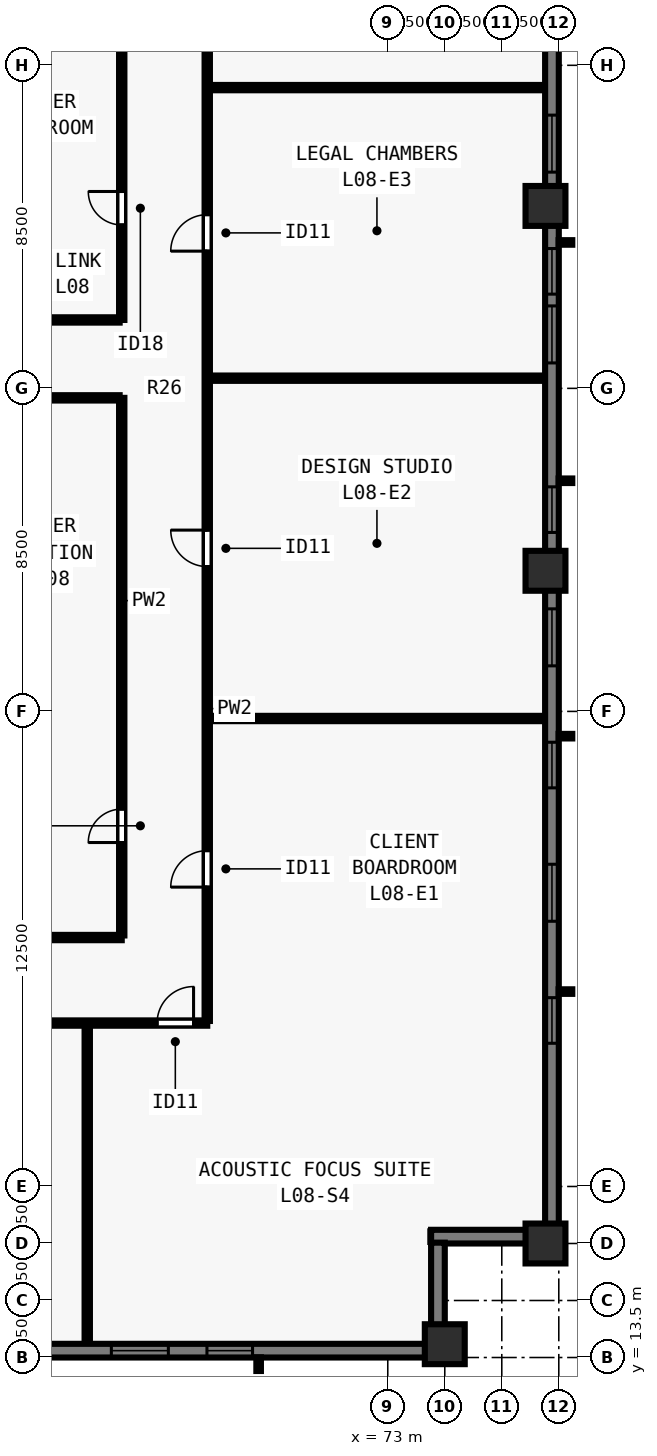
"""IFC4 building model, lengths in metres.
Left out: names, types, materials, properties, quantities, classifications, styles, units other than length and angle.
Written with IfcOpenShell. Run it as: python <this file> out.ifc"""

import sys

from ifc_helpers import new_model, si_unit, direction, frame, frame_2d, origin, origin_2d, place, context, subcontext, project, spatial, rectangle, extrude, element, fill, save


model = new_model("IFC4")
c1 = context("Model", 3, precision=1e-05, world=origin(), true_north=direction((0.0, 1.0)))
c2 = subcontext(c1, "Body", "Model", "MODEL_VIEW")
j1 = project(units=[si_unit("LENGTHUNIT", "METRE"), si_unit("PLANEANGLEUNIT", "RADIAN")], contexts=[c1])
p1 = place(None, origin())
s1 = spatial("IfcSite", under=j1, at=p1, CompositionType="ELEMENT")
p2 = place(p1, origin())
s2 = spatial("IfcBuilding", under=s1, at=p2, CompositionType="ELEMENT")
p3 = place(p2, frame((0.0, 0.0, 34.0)))
s3 = spatial("IfcBuildingStorey", under=s2, at=p3, CompositionType="ELEMENT", Elevation=34.0)
for number, where, z_axis, x_axis in (
    (1, (74.5, 13.85, 0.0), (0.0, 0.0, 1.0), (1.0, 0.0, 0.0)),
    (2, (77.15, 16.5, 0.0), (0.0, 0.0, 1.0), (0.0, 1.0, 0.0)),
    (3, (77.15, 34.2, 0.0), (0.0, 0.0, 1.0), (0.0, 1.0, 0.0)),
    (4, (77.15, 43.8, 0.0), (0.0, 0.0, 1.0), (0.0, 1.0, 0.0)),
):
    element("IfcColumn", number, at=place(p3, frame(where, z_axis=z_axis, x_axis=x_axis)), inside=s3, PredefinedType="COLUMN", context=c2, shape_type="SweptSolid", body=[
        extrude(rectangle(XDim=1.05, YDim=1.05, at=origin_2d()), origin(), (0.0, 0.0, 1.0), 3.5),
    ])
p4 = place(p3, frame((77.32, 61.5, 0.0), z_axis=(0.0, 0.0, 1.0), x_axis=(0.0, -1.0, 0.0)))
e5 = element("IfcWall", 5, at=p4, inside=s3, PredefinedType="SOLIDWALL", context=c2, shape_type="SweptSolid", body=[
    extrude(rectangle(XDim=44.662, YDim=0.36, at=frame_2d((22.331, 0.0))), origin(), (0.0, 0.0, 1.0), 3.28),
])
p5 = place(p4, frame((4.93, 0.0, 0.8)))
e6 = element("IfcOpeningElement", 6, at=p5, cuts=e5, PredefinedType="OPENING", context=c2, shape_type="SweptSolid", body=[
    extrude(rectangle(XDim=1.2, YDim=1.544, at=frame_2d((0.6, 0.772))), frame((0.0, 0.19, 0.0), z_axis=(0.0, -1.0, 0.0), x_axis=(1.0, 0.0, 0.0)), (0.0, 0.0, 1.0), 0.38),
])
p6 = place(p4, frame((8.14, 0.0, 0.8)))
e7 = element("IfcOpeningElement", 7, at=p6, cuts=e5, PredefinedType="OPENING", context=c2, shape_type="SweptSolid", body=[
    extrude(rectangle(XDim=1.5, YDim=1.544, at=frame_2d((0.75, 0.772))), frame((0.0, 0.19, 0.0), z_axis=(0.0, -1.0, 0.0), x_axis=(1.0, 0.0, 0.0)), (0.0, 0.0, 1.0), 0.38),
])
p7 = place(p4, frame((11.65, 0.0, 0.8)))
e8 = element("IfcOpeningElement", 8, at=p7, cuts=e5, PredefinedType="OPENING", context=c2, shape_type="SweptSolid", body=[
    extrude(rectangle(XDim=1.2, YDim=1.544, at=frame_2d((0.6, 0.772))), frame((0.0, 0.19, 0.0), z_axis=(0.0, -1.0, 0.0), x_axis=(1.0, 0.0, 0.0)), (0.0, 0.0, 1.0), 0.38),
])
p8 = place(p4, frame((15.311, 0.0, 0.8)))
e9 = element("IfcOpeningElement", 9, at=p8, cuts=e5, PredefinedType="OPENING", context=c2, shape_type="SweptSolid", body=[
    extrude(rectangle(XDim=1.5, YDim=1.544, at=frame_2d((0.75, 0.772))), frame((0.0, 0.19, 0.0), z_axis=(0.0, -1.0, 0.0), x_axis=(1.0, 0.0, 0.0)), (0.0, 0.0, 1.0), 0.38),
])
p9 = place(p4, frame((18.821, 0.0, 0.8)))
e10 = element("IfcOpeningElement", 10, at=p9, cuts=e5, PredefinedType="OPENING", context=c2, shape_type="SweptSolid", body=[
    extrude(rectangle(XDim=1.2, YDim=1.544, at=frame_2d((0.6, 0.772))), frame((0.0, 0.19, 0.0), z_axis=(0.0, -1.0, 0.0), x_axis=(1.0, 0.0, 0.0)), (0.0, 0.0, 1.0), 0.38),
])
p10 = place(p4, frame((20.331, 0.0, 0.8)))
e11 = element("IfcOpeningElement", 11, at=p10, cuts=e5, PredefinedType="OPENING", context=c2, shape_type="SweptSolid", body=[
    extrude(rectangle(XDim=1.5, YDim=1.544, at=frame_2d((0.75, 0.772))), frame((0.0, 0.19, 0.0), z_axis=(0.0, -1.0, 0.0), x_axis=(1.0, 0.0, 0.0)), (0.0, 0.0, 1.0), 0.38),
])
p11 = place(p4, frame((25.091, 0.0, 0.8)))
e12 = element("IfcOpeningElement", 12, at=p11, cuts=e5, PredefinedType="OPENING", context=c2, shape_type="SweptSolid", body=[
    extrude(rectangle(XDim=1.2, YDim=1.544, at=frame_2d((0.6, 0.772))), frame((0.0, 0.19, 0.0), z_axis=(0.0, -1.0, 0.0), x_axis=(1.0, 0.0, 0.0)), (0.0, 0.0, 1.0), 0.38),
])
p12 = place(p4, frame((28.302, 0.0, 0.8)))
e13 = element("IfcOpeningElement", 13, at=p12, cuts=e5, PredefinedType="OPENING", context=c2, shape_type="SweptSolid", body=[
    extrude(rectangle(XDim=1.5, YDim=1.544, at=frame_2d((0.75, 0.772))), frame((0.0, 0.19, 0.0), z_axis=(0.0, -1.0, 0.0), x_axis=(1.0, 0.0, 0.0)), (0.0, 0.0, 1.0), 0.38),
])
p13 = place(p4, frame((31.812, 0.0, 0.8)))
e14 = element("IfcOpeningElement", 14, at=p13, cuts=e5, PredefinedType="OPENING", context=c2, shape_type="SweptSolid", body=[
    extrude(rectangle(XDim=1.2, YDim=1.544, at=frame_2d((0.6, 0.772))), frame((0.0, 0.19, 0.0), z_axis=(0.0, -1.0, 0.0), x_axis=(1.0, 0.0, 0.0)), (0.0, 0.0, 1.0), 0.38),
])
p14 = place(p4, frame((35.022, 0.0, 0.8)))
e15 = element("IfcOpeningElement", 15, at=p14, cuts=e5, PredefinedType="OPENING", context=c2, shape_type="SweptSolid", body=[
    extrude(rectangle(XDim=1.5, YDim=1.544, at=frame_2d((0.75, 0.772))), frame((0.0, 0.19, 0.0), z_axis=(0.0, -1.0, 0.0), x_axis=(1.0, 0.0, 0.0)), (0.0, 0.0, 1.0), 0.38),
])
p15 = place(p4, frame((38.532, 0.0, 0.8)))
e16 = element("IfcOpeningElement", 16, at=p15, cuts=e5, PredefinedType="OPENING", context=c2, shape_type="SweptSolid", body=[
    extrude(rectangle(XDim=1.2, YDim=1.544, at=frame_2d((0.6, 0.772))), frame((0.0, 0.19, 0.0), z_axis=(0.0, -1.0, 0.0), x_axis=(1.0, 0.0, 0.0)), (0.0, 0.0, 1.0), 0.38),
])
p16 = place(p3, frame((77.5, 16.68, 0.0), z_axis=(0.0, 0.0, 1.0), x_axis=(-1.0, 0.0, 0.0)))
e17 = element("IfcWall", 17, at=p16, inside=s3, PredefinedType="SOLIDWALL", context=c2, shape_type="SweptSolid", body=[
    extrude(rectangle(XDim=3.36, YDim=0.36, at=frame_2d((1.68, 0.0))), origin(), (0.0, 0.0, 1.0), 3.28),
])
p17 = place(p3, frame((74.32, 16.522, 0.0), z_axis=(0.0, 0.0, 1.0), x_axis=(0.0, -1.0, 0.0)))
e18 = element("IfcWall", 18, at=p17, inside=s3, PredefinedType="SOLIDWALL", context=c2, shape_type="SweptSolid", body=[
    extrude(rectangle(XDim=2.684, YDim=0.36, at=frame_2d((1.342, 0.0))), origin(), (0.0, 0.0, 1.0), 3.28),
])
p18 = place(p3, frame((74.5, 13.68, 0.0), z_axis=(0.0, 0.0, 1.0), x_axis=(-1.0, 0.0, 0.0)))
e19 = element("IfcWall", 19, at=p18, inside=s3, PredefinedType="SOLIDWALL", context=c2, shape_type="SweptSolid", body=[
    extrude(rectangle(XDim=19.562, YDim=0.36, at=frame_2d((9.781, 0.0))), origin(), (0.0, 0.0, 1.0), 3.28),
])
p19 = place(p18, frame((5.058, 0.0, 0.8)))
e20 = element("IfcOpeningElement", 20, at=p19, cuts=e19, PredefinedType="OPENING", context=c2, shape_type="SweptSolid", body=[
    extrude(rectangle(XDim=1.2, YDim=1.544, at=frame_2d((0.6, 0.772))), frame((0.0, 0.19, 0.0), z_axis=(0.0, -1.0, 0.0), x_axis=(1.0, 0.0, 0.0)), (0.0, 0.0, 1.0), 0.38),
])
p20 = place(p18, frame((7.273, 0.0, 0.8)))
e21 = element("IfcOpeningElement", 21, at=p20, cuts=e19, PredefinedType="OPENING", context=c2, shape_type="SweptSolid", body=[
    extrude(rectangle(XDim=1.5, YDim=1.544, at=frame_2d((0.75, 0.772))), frame((0.0, 0.19, 0.0), z_axis=(0.0, -1.0, 0.0), x_axis=(1.0, 0.0, 0.0)), (0.0, 0.0, 1.0), 0.38),
])
p21 = place(p18, frame((12.289, 0.0, 0.8)))
e22 = element("IfcOpeningElement", 22, at=p21, cuts=e19, PredefinedType="OPENING", context=c2, shape_type="SweptSolid", body=[
    extrude(rectangle(XDim=1.2, YDim=1.544, at=frame_2d((0.6, 0.772))), frame((0.0, 0.19, 0.0), z_axis=(0.0, -1.0, 0.0), x_axis=(1.0, 0.0, 0.0)), (0.0, 0.0, 1.0), 0.38),
])
p22 = place(p18, frame((15.304, 0.0, 0.8)))
e23 = element("IfcOpeningElement", 23, at=p22, cuts=e19, PredefinedType="OPENING", context=c2, shape_type="SweptSolid", body=[
    extrude(rectangle(XDim=1.5, YDim=1.544, at=frame_2d((0.75, 0.772))), frame((0.0, 0.19, 0.0), z_axis=(0.0, -1.0, 0.0), x_axis=(1.0, 0.0, 0.0)), (0.0, 0.0, 1.0), 0.38),
])
p23 = place(p3, frame((35.75, 22.3, 0.0), z_axis=(0.0, 0.0, 1.0), x_axis=(1.0, 0.0, 0.0)))
e24 = element("IfcWall", 24, at=p23, inside=s3, PredefinedType="PARTITIONING", context=c2, shape_type="SweptSolid", body=[
    extrude(rectangle(XDim=32.5, YDim=0.14, at=frame_2d((16.25, 0.0))), origin(), (0.0, 0.0, 1.0), 3.28),
])
p24 = place(p23, frame((1.604, 0.0, 0.0)))
e25 = element("IfcOpeningElement", 25, at=p24, cuts=e24, PredefinedType="OPENING", context=c2, shape_type="SweptSolid", body=[
    extrude(rectangle(XDim=0.96, YDim=2.12, at=frame_2d((0.48, 1.06))), frame((0.0, 0.08, 0.0), z_axis=(0.0, -1.0, 0.0), x_axis=(1.0, 0.0, 0.0)), (0.0, 0.0, 1.0), 0.16),
])
p25 = place(p23, frame((9.585, 0.0, 0.0)))
e26 = element("IfcOpeningElement", 26, at=p25, cuts=e24, PredefinedType="OPENING", context=c2, shape_type="SweptSolid", body=[
    extrude(rectangle(XDim=0.96, YDim=2.12, at=frame_2d((0.48, 1.06))), frame((0.0, 0.08, 0.0), z_axis=(0.0, -1.0, 0.0), x_axis=(1.0, 0.0, 0.0)), (0.0, 0.0, 1.0), 0.16),
])
p26 = place(p23, frame((22.125, 0.0, 0.0)))
e27 = element("IfcOpeningElement", 27, at=p26, cuts=e24, PredefinedType="OPENING", context=c2, shape_type="SweptSolid", body=[
    extrude(rectangle(XDim=0.96, YDim=2.12, at=frame_2d((0.48, 1.06))), frame((0.0, 0.08, 0.0), z_axis=(0.0, -1.0, 0.0), x_axis=(1.0, 0.0, 0.0)), (0.0, 0.0, 1.0), 0.16),
])
p27 = place(p23, frame((31.18, 0.0, 0.0)))
e28 = element("IfcOpeningElement", 28, at=p27, cuts=e24, PredefinedType="OPENING", context=c2, shape_type="SweptSolid", body=[
    extrude(rectangle(XDim=0.96, YDim=2.12, at=frame_2d((0.48, 1.06))), frame((0.0, 0.08, 0.0), z_axis=(0.0, -1.0, 0.0), x_axis=(1.0, 0.0, 0.0)), (0.0, 0.0, 1.0), 0.16),
])
p28 = place(p3, frame((68.25, 22.355, 0.0), z_axis=(0.0, 0.0, 1.0), x_axis=(0.0, 1.0, 0.0)))
e29 = element("IfcWall", 29, at=p28, inside=s3, PredefinedType="PARTITIONING", context=c2, shape_type="SweptSolid", body=[
    extrude(rectangle(XDim=33.29, YDim=0.14, at=frame_2d((16.645, 0.0))), origin(), (0.0, 0.0, 1.0), 3.28),
])
p29 = place(p28, frame((3.522, 0.0, 0.0)))
e30 = element("IfcOpeningElement", 30, at=p29, cuts=e29, PredefinedType="OPENING", context=c2, shape_type="SweptSolid", body=[
    extrude(rectangle(XDim=0.96, YDim=2.12, at=frame_2d((0.48, 1.06))), frame((0.0, 0.08, 0.0), z_axis=(0.0, -1.0, 0.0), x_axis=(1.0, 0.0, 0.0)), (0.0, 0.0, 1.0), 0.16),
])
p30 = place(p28, frame((11.956, 0.0, 0.0)))
e31 = element("IfcOpeningElement", 31, at=p30, cuts=e29, PredefinedType="OPENING", context=c2, shape_type="SweptSolid", body=[
    extrude(rectangle(XDim=0.96, YDim=2.12, at=frame_2d((0.48, 1.06))), frame((0.0, 0.08, 0.0), z_axis=(0.0, -1.0, 0.0), x_axis=(1.0, 0.0, 0.0)), (0.0, 0.0, 1.0), 0.16),
])
p31 = place(p28, frame((20.256, 0.0, 0.0)))
e32 = element("IfcOpeningElement", 32, at=p31, cuts=e29, PredefinedType="OPENING", context=c2, shape_type="SweptSolid", body=[
    extrude(rectangle(XDim=0.96, YDim=2.12, at=frame_2d((0.48, 1.06))), frame((0.0, 0.08, 0.0), z_axis=(0.0, -1.0, 0.0), x_axis=(1.0, 0.0, 0.0)), (0.0, 0.0, 1.0), 0.16),
])
p32 = place(p28, frame((28.422, 0.0, 0.0)))
e33 = element("IfcOpeningElement", 33, at=p32, cuts=e29, PredefinedType="OPENING", context=c2, shape_type="SweptSolid", body=[
    extrude(rectangle(XDim=0.96, YDim=2.12, at=frame_2d((0.48, 1.06))), frame((0.0, 0.08, 0.0), z_axis=(0.0, -1.0, 0.0), x_axis=(1.0, 0.0, 0.0)), (0.0, 0.0, 1.0), 0.16),
])
p33 = place(p3, frame((38.0, 24.55, 0.0), z_axis=(0.0, 0.0, 1.0), x_axis=(1.0, 0.0, 0.0)))
e34 = element("IfcWall", 34, at=p33, inside=s3, PredefinedType="PARTITIONING", context=c2, shape_type="SweptSolid", body=[
    extrude(rectangle(XDim=28.0, YDim=0.14, at=frame_2d((14.0, 0.0))), origin(), (0.0, 0.0, 1.0), 3.28),
])
p34 = place(p33, frame((1.2, 0.0, 0.0)))
e35 = element("IfcOpeningElement", 35, at=p34, cuts=e34, PredefinedType="OPENING", context=c2, shape_type="SweptSolid", body=[
    extrude(rectangle(XDim=0.88, YDim=2.1, at=frame_2d((0.44, 1.05))), frame((0.0, 0.08, 0.0), z_axis=(0.0, -1.0, 0.0), x_axis=(1.0, 0.0, 0.0)), (0.0, 0.0, 1.0), 0.16),
])
p35 = place(p33, frame((10.5, 0.0, 0.0)))
e36 = element("IfcOpeningElement", 36, at=p35, cuts=e34, PredefinedType="OPENING", context=c2, shape_type="SweptSolid", body=[
    extrude(rectangle(XDim=0.88, YDim=2.1, at=frame_2d((0.44, 1.05))), frame((0.0, 0.08, 0.0), z_axis=(0.0, -1.0, 0.0), x_axis=(1.0, 0.0, 0.0)), (0.0, 0.0, 1.0), 0.16),
])
p36 = place(p33, frame((21.0, 0.0, 0.0)))
e37 = element("IfcOpeningElement", 37, at=p36, cuts=e34, PredefinedType="OPENING", context=c2, shape_type="SweptSolid", body=[
    extrude(rectangle(XDim=0.88, YDim=2.1, at=frame_2d((0.44, 1.05))), frame((0.0, 0.08, 0.0), z_axis=(0.0, -1.0, 0.0), x_axis=(1.0, 0.0, 0.0)), (0.0, 0.0, 1.0), 0.16),
])
p37 = place(p3, frame((66.0, 24.605, 0.0), z_axis=(0.0, 0.0, 1.0), x_axis=(0.0, 1.0, 0.0)))
e38 = element("IfcWall", 38, at=p37, inside=s3, PredefinedType="PARTITIONING", context=c2, shape_type="SweptSolid", body=[
    extrude(rectangle(XDim=14.145, YDim=0.14, at=frame_2d((7.073, 0.0))), origin(), (0.0, 0.0, 1.0), 3.28),
])
p38 = place(p37, frame((2.445, 0.0, 0.0)))
e39 = element("IfcOpeningElement", 39, at=p38, cuts=e38, PredefinedType="OPENING", context=c2, shape_type="SweptSolid", body=[
    extrude(rectangle(XDim=0.88, YDim=2.1, at=frame_2d((0.44, 1.05))), frame((0.0, 0.08, 0.0), z_axis=(0.0, -1.0, 0.0), x_axis=(1.0, 0.0, 0.0)), (0.0, 0.0, 1.0), 0.16),
])
p39 = place(p3, frame((66.0, 40.8, 0.0), z_axis=(0.0, 0.0, 1.0), x_axis=(0.0, 1.0, 0.0)))
e40 = element("IfcWall", 40, at=p39, inside=s3, PredefinedType="PARTITIONING", context=c2, shape_type="SweptSolid", body=[
    extrude(rectangle(XDim=12.595, YDim=0.14, at=frame_2d((6.297, 0.0))), origin(), (0.0, 0.0, 1.0), 3.28),
])
p40 = place(p39, frame((2.5, 0.0, 0.0)))
e41 = element("IfcOpeningElement", 41, at=p40, cuts=e40, PredefinedType="OPENING", context=c2, shape_type="SweptSolid", body=[
    extrude(rectangle(XDim=0.88, YDim=2.1, at=frame_2d((0.44, 1.05))), frame((0.0, 0.08, 0.0), z_axis=(0.0, -1.0, 0.0), x_axis=(1.0, 0.0, 0.0)), (0.0, 0.0, 1.0), 0.16),
])
for number, where, z_axis, x_axis in (
    (42, (60.76, 38.75, 0.0), (0.0, 0.0, 1.0), (1.0, 0.0, 0.0)),
    (43, (60.76, 40.8, 0.0), (0.0, 0.0, 1.0), (1.0, 0.0, 0.0)),
):
    element("IfcWall", number, at=place(p3, frame(where, z_axis=z_axis, x_axis=x_axis)), inside=s3, PredefinedType="PARTITIONING", context=c2, shape_type="SweptSolid", body=[
        extrude(rectangle(XDim=5.185, YDim=0.14, at=frame_2d((2.593, 0.0))), origin(), (0.0, 0.0, 1.0), 3.28),
    ])
p41 = place(p3, frame((65.093, 13.92, 0.0), z_axis=(0.0, 0.0, 1.0), x_axis=(0.0, 1.0, 0.0)))
e44 = element("IfcWall", 44, at=p41, inside=s3, PredefinedType="PARTITIONING", context=c2, shape_type="SweptSolid", body=[
    extrude(rectangle(XDim=8.28, YDim=0.14, at=frame_2d((4.14, 0.0))), origin(), (0.0, 0.0, 1.0), 3.28),
])
for number, where, z_axis, x_axis in (
    (45, (68.35, 30.313, 0.0), (0.0, 0.0, 1.0), (1.0, 0.0, 0.0)),
    (46, (68.35, 39.268, 0.0), (0.0, 0.0, 1.0), (1.0, 0.0, 0.0)),
    (47, (68.35, 46.913, 0.0), (0.0, 0.0, 1.0), (1.0, 0.0, 0.0)),
):
    element("IfcWall", number, at=place(p3, frame(where, z_axis=z_axis, x_axis=x_axis)), inside=s3, PredefinedType="PARTITIONING", context=c2, shape_type="SweptSolid", body=[
        extrude(rectangle(XDim=8.73, YDim=0.14, at=frame_2d((4.365, 0.0))), origin(), (0.0, 0.0, 1.0), 3.28),
    ])
p42 = place(p8, origin())
e48 = element("IfcWindow", 48, at=p42, inside=s3, PartitioningType="SINGLE_PANEL", PredefinedType="WINDOW", context=c2, shape_type="SweptSolid", body=[
    extrude(rectangle(XDim=1.5, YDim=1.544, at=frame_2d((0.75, 0.772))), frame((0.0, -0.05, 0.0), z_axis=(0.0, -1.0, 0.0), x_axis=(1.0, 0.0, 0.0)), (0.0, 0.0, 1.0), 0.06),
])
fill(e9, e48)
p43 = place(p9, origin())
e49 = element("IfcWindow", 49, at=p43, inside=s3, PartitioningType="SINGLE_PANEL", PredefinedType="WINDOW", context=c2, shape_type="SweptSolid", body=[
    extrude(rectangle(XDim=1.2, YDim=1.544, at=frame_2d((0.6, 0.772))), frame((0.0, -0.05, 0.0), z_axis=(0.0, -1.0, 0.0), x_axis=(1.0, 0.0, 0.0)), (0.0, 0.0, 1.0), 0.06),
])
fill(e10, e49)
p44 = place(p10, origin())
e50 = element("IfcWindow", 50, at=p44, inside=s3, PartitioningType="SINGLE_PANEL", PredefinedType="WINDOW", context=c2, shape_type="SweptSolid", body=[
    extrude(rectangle(XDim=1.5, YDim=1.544, at=frame_2d((0.75, 0.772))), frame((0.0, -0.05, 0.0), z_axis=(0.0, -1.0, 0.0), x_axis=(1.0, 0.0, 0.0)), (0.0, 0.0, 1.0), 0.06),
])
fill(e11, e50)
p45 = place(p11, origin())
e51 = element("IfcWindow", 51, at=p45, inside=s3, PartitioningType="SINGLE_PANEL", PredefinedType="WINDOW", context=c2, shape_type="SweptSolid", body=[
    extrude(rectangle(XDim=1.2, YDim=1.544, at=frame_2d((0.6, 0.772))), frame((0.0, -0.05, 0.0), z_axis=(0.0, -1.0, 0.0), x_axis=(1.0, 0.0, 0.0)), (0.0, 0.0, 1.0), 0.06),
])
fill(e12, e51)
p46 = place(p12, origin())
e52 = element("IfcWindow", 52, at=p46, inside=s3, PartitioningType="SINGLE_PANEL", PredefinedType="WINDOW", context=c2, shape_type="SweptSolid", body=[
    extrude(rectangle(XDim=1.5, YDim=1.544, at=frame_2d((0.75, 0.772))), frame((0.0, -0.05, 0.0), z_axis=(0.0, -1.0, 0.0), x_axis=(1.0, 0.0, 0.0)), (0.0, 0.0, 1.0), 0.06),
])
fill(e13, e52)
p47 = place(p13, origin())
e53 = element("IfcWindow", 53, at=p47, inside=s3, PartitioningType="SINGLE_PANEL", PredefinedType="WINDOW", context=c2, shape_type="SweptSolid", body=[
    extrude(rectangle(XDim=1.2, YDim=1.544, at=frame_2d((0.6, 0.772))), frame((0.0, -0.05, 0.0), z_axis=(0.0, -1.0, 0.0), x_axis=(1.0, 0.0, 0.0)), (0.0, 0.0, 1.0), 0.06),
])
fill(e14, e53)
p48 = place(p14, origin())
e54 = element("IfcWindow", 54, at=p48, inside=s3, PartitioningType="SINGLE_PANEL", PredefinedType="WINDOW", context=c2, shape_type="SweptSolid", body=[
    extrude(rectangle(XDim=1.5, YDim=1.544, at=frame_2d((0.75, 0.772))), frame((0.0, -0.05, 0.0), z_axis=(0.0, -1.0, 0.0), x_axis=(1.0, 0.0, 0.0)), (0.0, 0.0, 1.0), 0.06),
])
fill(e15, e54)
p49 = place(p15, origin())
e55 = element("IfcWindow", 55, at=p49, inside=s3, PartitioningType="SINGLE_PANEL", PredefinedType="WINDOW", context=c2, shape_type="SweptSolid", body=[
    extrude(rectangle(XDim=1.2, YDim=1.544, at=frame_2d((0.6, 0.772))), frame((0.0, -0.05, 0.0), z_axis=(0.0, -1.0, 0.0), x_axis=(1.0, 0.0, 0.0)), (0.0, 0.0, 1.0), 0.06),
])
fill(e16, e55)
p50 = place(p19, origin())
e56 = element("IfcWindow", 56, at=p50, inside=s3, PartitioningType="SINGLE_PANEL", PredefinedType="WINDOW", context=c2, shape_type="SweptSolid", body=[
    extrude(rectangle(XDim=1.2, YDim=1.544, at=frame_2d((0.6, 0.772))), frame((0.0, -0.05, 0.0), z_axis=(0.0, -1.0, 0.0), x_axis=(1.0, 0.0, 0.0)), (0.0, 0.0, 1.0), 0.06),
])
fill(e20, e56)
p51 = place(p20, origin())
e57 = element("IfcWindow", 57, at=p51, inside=s3, PartitioningType="SINGLE_PANEL", PredefinedType="WINDOW", context=c2, shape_type="SweptSolid", body=[
    extrude(rectangle(XDim=1.5, YDim=1.544, at=frame_2d((0.75, 0.772))), frame((0.0, -0.05, 0.0), z_axis=(0.0, -1.0, 0.0), x_axis=(1.0, 0.0, 0.0)), (0.0, 0.0, 1.0), 0.06),
])
fill(e21, e57)
p52 = place(p38, origin())
e58 = element("IfcDoor", 58, at=p52, inside=s3, OperationType="SINGLE_SWING_LEFT", PredefinedType="DOOR", context=c2, shape_type="SweptSolid", body=[
    extrude(rectangle(XDim=0.88, YDim=2.1, at=frame_2d((0.44, 1.05))), frame((0.0, 0.025, 0.0), z_axis=(0.0, -1.0, 0.0), x_axis=(1.0, 0.0, 0.0)), (0.0, 0.0, 1.0), 0.05),
])
fill(e39, e58)
p53 = place(p40, origin())
e59 = element("IfcDoor", 59, at=p53, inside=s3, OperationType="SINGLE_SWING_RIGHT", PredefinedType="DOOR", context=c2, shape_type="SweptSolid", body=[
    extrude(rectangle(XDim=0.88, YDim=2.1, at=frame_2d((0.44, 1.05))), frame((0.0, 0.025, 0.0), z_axis=(0.0, -1.0, 0.0), x_axis=(1.0, 0.0, 0.0)), (0.0, 0.0, 1.0), 0.05),
])
fill(e41, e59)
p54 = place(p27, origin())
e60 = element("IfcDoor", 60, at=p54, inside=s3, OperationType="SINGLE_SWING_RIGHT", PredefinedType="DOOR", context=c2, shape_type="SweptSolid", body=[
    extrude(rectangle(XDim=0.96, YDim=2.12, at=frame_2d((0.48, 1.06))), frame((0.0, 0.025, 0.0), z_axis=(0.0, -1.0, 0.0), x_axis=(1.0, 0.0, 0.0)), (0.0, 0.0, 1.0), 0.05),
])
fill(e28, e60)
p55 = place(p29, origin())
e61 = element("IfcDoor", 61, at=p55, inside=s3, OperationType="SINGLE_SWING_LEFT", PredefinedType="DOOR", context=c2, shape_type="SweptSolid", body=[
    extrude(rectangle(XDim=0.96, YDim=2.12, at=frame_2d((0.48, 1.06))), frame((0.0, 0.025, 0.0), z_axis=(0.0, -1.0, 0.0), x_axis=(1.0, 0.0, 0.0)), (0.0, 0.0, 1.0), 0.05),
])
fill(e30, e61)
p56 = place(p30, origin())
e62 = element("IfcDoor", 62, at=p56, inside=s3, OperationType="SINGLE_SWING_RIGHT", PredefinedType="DOOR", context=c2, shape_type="SweptSolid", body=[
    extrude(rectangle(XDim=0.96, YDim=2.12, at=frame_2d((0.48, 1.06))), frame((0.0, 0.025, 0.0), z_axis=(0.0, -1.0, 0.0), x_axis=(1.0, 0.0, 0.0)), (0.0, 0.0, 1.0), 0.05),
])
fill(e31, e62)
p57 = place(p31, origin())
e63 = element("IfcDoor", 63, at=p57, inside=s3, OperationType="SINGLE_SWING_LEFT", PredefinedType="DOOR", context=c2, shape_type="SweptSolid", body=[
    extrude(rectangle(XDim=0.96, YDim=2.12, at=frame_2d((0.48, 1.06))), frame((0.0, 0.025, 0.0), z_axis=(0.0, -1.0, 0.0), x_axis=(1.0, 0.0, 0.0)), (0.0, 0.0, 1.0), 0.05),
])
fill(e32, e63)
save(model, sys.argv[1])
